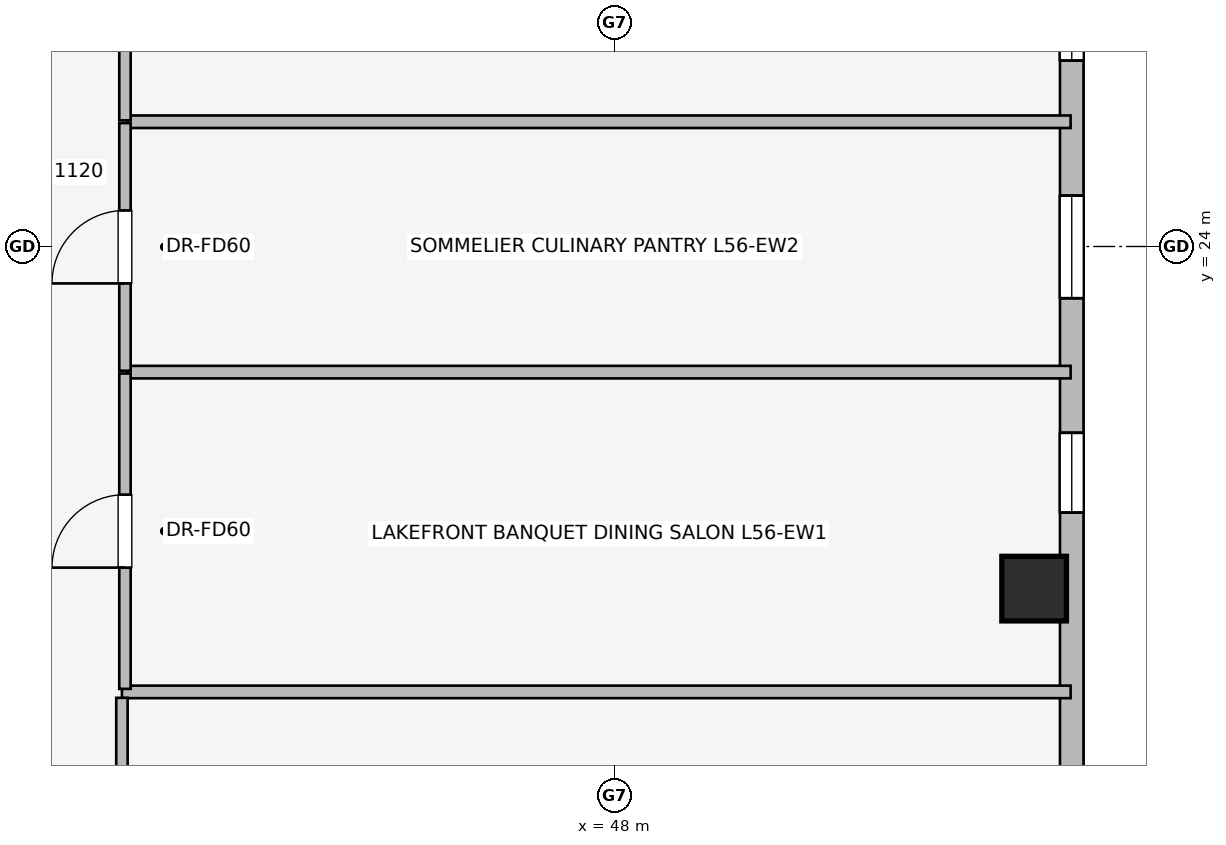
"""IFC4 building model, lengths in metres.
Left out: names, types, materials, properties, quantities, classifications, styles, units other than length and angle.
Written with IfcOpenShell. Run it as: python <this file> out.ifc"""

import sys

from ifc_helpers import new_model, si_unit, direction, frame, frame_2d, origin, origin_2d, place, context, subcontext, project, spatial, rectangle, extrude, element, fill, save


model = new_model("IFC4")
c1 = context("Model", 3, precision=1e-05, world=origin(), true_north=direction((0.0, 1.0)))
c2 = subcontext(c1, "Body", "Model", "MODEL_VIEW")
j1 = project(units=[si_unit("LENGTHUNIT", "METRE"), si_unit("PLANEANGLEUNIT", "RADIAN")], contexts=[c1])
p1 = place(None, origin())
s1 = spatial("IfcSite", under=j1, at=p1, CompositionType="ELEMENT")
p2 = place(p1, origin())
s2 = spatial("IfcBuilding", under=s1, at=p2, CompositionType="ELEMENT")
p3 = place(p2, frame((0.0, 0.0, 206.8)))
s3 = spatial("IfcBuildingStorey", under=s2, at=p3, CompositionType="ELEMENT", Elevation=206.8)
p4 = place(p3, frame((53.522, 19.499, 0.0), z_axis=(0.0, 0.0, 1.0), x_axis=(1.0, 0.0, 0.0)))
e1 = element("IfcColumn", 1, at=p4, inside=s3, PredefinedType="COLUMN", context=c2, shape_type="SweptSolid", body=[
    extrude(rectangle(XDim=0.85, YDim=0.85, at=origin_2d()), origin(), (0.0, 0.0, 1.0), 3.45),
])
p5 = place(p3, frame((54.017, 31.502, 0.0), z_axis=(0.0, 0.0, 1.0), x_axis=(0.0, -1.0, 0.0)))
e2 = element("IfcWall", 2, at=p5, inside=s3, PredefinedType="STANDARD", context=c2, shape_type="SweptSolid", body=[
    extrude(rectangle(XDim=15.004, YDim=0.31, at=frame_2d((7.502, 0.0))), origin(), (0.0, 0.0, 1.0), 3.19),
])
p6 = place(p5, frame((4.007, 0.0, 0.75)))
e3 = element("IfcOpeningElement", 3, at=p6, cuts=e2, PredefinedType="OPENING", context=c2, shape_type="SweptSolid", body=[
    extrude(rectangle(XDim=1.05, YDim=1.4, at=frame_2d((0.525, 0.7))), frame((0.0, 0.165, 0.0), z_axis=(0.0, -1.0, 0.0), x_axis=(1.0, 0.0, 0.0)), (0.0, 0.0, 1.0), 0.33),
])
p7 = place(p5, frame((6.833, 0.0, 0.75)))
e4 = element("IfcOpeningElement", 4, at=p7, cuts=e2, PredefinedType="OPENING", context=c2, shape_type="SweptSolid", body=[
    extrude(rectangle(XDim=1.35, YDim=1.45, at=frame_2d((0.675, 0.725))), frame((0.0, 0.165, 0.0), z_axis=(0.0, -1.0, 0.0), x_axis=(1.0, 0.0, 0.0)), (0.0, 0.0, 1.0), 0.33),
])
p8 = place(p5, frame((9.953, 0.0, 0.75)))
e5 = element("IfcOpeningElement", 5, at=p8, cuts=e2, PredefinedType="OPENING", context=c2, shape_type="SweptSolid", body=[
    extrude(rectangle(XDim=1.05, YDim=1.4, at=frame_2d((0.525, 0.7))), frame((0.0, 0.165, 0.0), z_axis=(0.0, -1.0, 0.0), x_axis=(1.0, 0.0, 0.0)), (0.0, 0.0, 1.0), 0.33),
])
p9 = place(p3, frame((41.52, 18.14, 0.0), z_axis=(0.0, 0.0, 1.0), x_axis=(1.0, 0.0, 0.0)))
e6 = element("IfcWall", 6, at=p9, inside=s3, PredefinedType="PARTITIONING", context=c2, shape_type="SweptSolid", body=[
    extrude(rectangle(XDim=12.482, YDim=0.165, at=frame_2d((6.241, 0.0))), origin(), (0.0, 0.0, 1.0), 3.19),
])
for number, where, z_axis, x_axis in (
    (7, (41.59, 22.347, 0.0), (0.0, 0.0, 1.0), (1.0, 0.0, 0.0)),
    (8, (41.59, 25.641, 0.0), (0.0, 0.0, 1.0), (1.0, 0.0, 0.0)),
):
    element("IfcWall", number, at=place(p3, frame(where, z_axis=z_axis, x_axis=x_axis)), inside=s3, PredefinedType="PARTITIONING", context=c2, shape_type="SweptSolid", body=[
        extrude(rectangle(XDim=12.412, YDim=0.165, at=frame_2d((6.206, 0.0))), origin(), (0.0, 0.0, 1.0), 3.19),
    ])
p10 = place(p3, frame((41.56, 18.18, 0.0), z_axis=(0.0, 0.0, 1.0), x_axis=(0.0, 1.0, 0.0)))
e9 = element("IfcWall", 9, at=p10, inside=s3, PredefinedType="PARTITIONING", context=c2, shape_type="SweptSolid", body=[
    extrude(rectangle(XDim=4.149, YDim=0.15, at=frame_2d((2.075, 0.0))), origin(), (0.0, 0.0, 1.0), 3.19),
])
p11 = place(p10, frame((1.595, 0.0, 0.0)))
e10 = element("IfcOpeningElement", 10, at=p11, cuts=e9, PredefinedType="OPENING", context=c2, shape_type="SweptSolid", body=[
    extrude(rectangle(XDim=0.96, YDim=2.0, at=frame_2d((0.48, 1.0))), frame((0.0, 0.085, 0.0), z_axis=(0.0, -1.0, 0.0), x_axis=(1.0, 0.0, 0.0)), (0.0, 0.0, 1.0), 0.17),
])
p12 = place(p3, frame((41.56, 22.365, 0.0), z_axis=(0.0, 0.0, 1.0), x_axis=(0.0, 1.0, 0.0)))
e11 = element("IfcWall", 11, at=p12, inside=s3, PredefinedType="PARTITIONING", context=c2, shape_type="SweptSolid", body=[
    extrude(rectangle(XDim=3.258, YDim=0.15, at=frame_2d((1.629, 0.0))), origin(), (0.0, 0.0, 1.0), 3.19),
])
p13 = place(p12, frame((1.149, 0.0, 0.0)))
e12 = element("IfcOpeningElement", 12, at=p13, cuts=e11, PredefinedType="OPENING", context=c2, shape_type="SweptSolid", body=[
    extrude(rectangle(XDim=0.96, YDim=2.0, at=frame_2d((0.48, 1.0))), frame((0.0, 0.085, 0.0), z_axis=(0.0, -1.0, 0.0), x_axis=(1.0, 0.0, 0.0)), (0.0, 0.0, 1.0), 0.17),
])
p14 = place(p3, frame((41.56, 25.659, 0.0), z_axis=(0.0, 0.0, 1.0), x_axis=(0.0, 1.0, 0.0)))
e13 = element("IfcWall", 13, at=p14, inside=s3, PredefinedType="PARTITIONING", context=c2, shape_type="SweptSolid", body=[
    extrude(rectangle(XDim=4.161, YDim=0.15, at=frame_2d((2.081, 0.0))), origin(), (0.0, 0.0, 1.0), 3.19),
])
p15 = place(p14, frame((1.601, 0.0, 0.0)))
e14 = element("IfcOpeningElement", 14, at=p15, cuts=e13, PredefinedType="OPENING", context=c2, shape_type="SweptSolid", body=[
    extrude(rectangle(XDim=0.96, YDim=2.0, at=frame_2d((0.48, 1.0))), frame((0.0, 0.085, 0.0), z_axis=(0.0, -1.0, 0.0), x_axis=(1.0, 0.0, 0.0)), (0.0, 0.0, 1.0), 0.17),
])
p16 = place(p3, frame((41.52, 15.92, 0.0), z_axis=(0.0, 0.0, 1.0), x_axis=(0.0, 1.0, 0.0)))
e15 = element("IfcWall", 15, at=p16, inside=s3, PredefinedType="PARTITIONING", context=c2, shape_type="SweptSolid", body=[
    extrude(rectangle(XDim=2.142, YDim=0.15, at=frame_2d((1.071, 0.0))), origin(), (0.0, 0.0, 1.0), 3.19),
])
p17 = place(p6, origin())
e16 = element("IfcWindow", 16, at=p17, inside=s3, PartitioningType="SINGLE_PANEL", PredefinedType="WINDOW", context=c2, shape_type="SweptSolid", body=[
    extrude(rectangle(XDim=1.05, YDim=1.4, at=frame_2d((0.525, 0.7))), frame((0.0, 0.03, 0.0), z_axis=(0.0, -1.0, 0.0), x_axis=(1.0, 0.0, 0.0)), (0.0, 0.0, 1.0), 0.06),
])
fill(e3, e16)
p18 = place(p7, origin())
e17 = element("IfcWindow", 17, at=p18, inside=s3, PartitioningType="SINGLE_PANEL", PredefinedType="WINDOW", context=c2, shape_type="SweptSolid", body=[
    extrude(rectangle(XDim=1.35, YDim=1.45, at=frame_2d((0.675, 0.725))), frame((0.0, 0.03, 0.0), z_axis=(0.0, -1.0, 0.0), x_axis=(1.0, 0.0, 0.0)), (0.0, 0.0, 1.0), 0.06),
])
fill(e4, e17)
p19 = place(p8, origin())
e18 = element("IfcWindow", 18, at=p19, inside=s3, PartitioningType="SINGLE_PANEL", PredefinedType="WINDOW", context=c2, shape_type="SweptSolid", body=[
    extrude(rectangle(XDim=1.05, YDim=1.4, at=frame_2d((0.525, 0.7))), frame((0.0, 0.03, 0.0), z_axis=(0.0, -1.0, 0.0), x_axis=(1.0, 0.0, 0.0)), (0.0, 0.0, 1.0), 0.06),
])
fill(e5, e18)
p20 = place(p11, origin())
e19 = element("IfcDoor", 19, at=p20, inside=s3, OperationType="SINGLE_SWING_LEFT", PredefinedType="DOOR", context=c2, shape_type="SweptSolid", body=[
    extrude(rectangle(XDim=0.96, YDim=2.0, at=frame_2d((0.48, 1.0))), frame((0.0, 0.025, 0.0), z_axis=(0.0, -1.0, 0.0), x_axis=(1.0, 0.0, 0.0)), (0.0, 0.0, 1.0), 0.05),
])
fill(e10, e19)
p21 = place(p13, origin())
e20 = element("IfcDoor", 20, at=p21, inside=s3, OperationType="SINGLE_SWING_LEFT", PredefinedType="DOOR", context=c2, shape_type="SweptSolid", body=[
    extrude(rectangle(XDim=0.96, YDim=2.0, at=frame_2d((0.48, 1.0))), frame((0.0, 0.025, 0.0), z_axis=(0.0, -1.0, 0.0), x_axis=(1.0, 0.0, 0.0)), (0.0, 0.0, 1.0), 0.05),
])
fill(e12, e20)
save(model, sys.argv[1])
